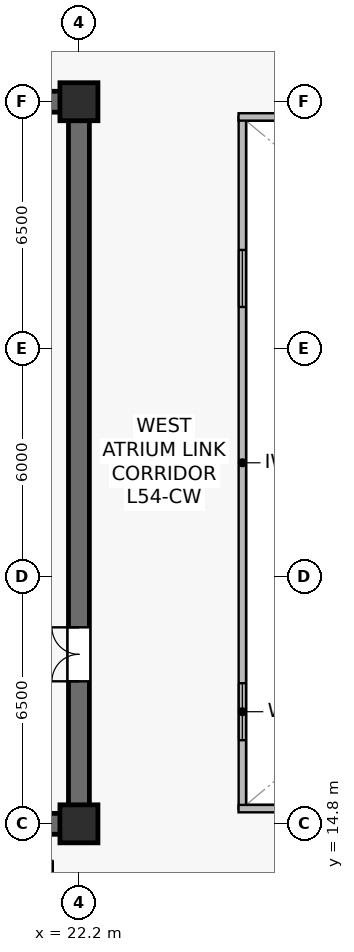
"""IFC4 building model, lengths in metres.
Left out: names, types, materials, properties, quantities, classifications, styles, units other than length and angle.
Written with IfcOpenShell. Run it as: python <this file> out.ifc"""

import sys

from ifc_helpers import new_model, si_unit, direction, frame, frame_2d, origin, origin_2d, place, context, subcontext, project, spatial, rectangle, extrude, source, transform, mapped, element, fill, save


model = new_model("IFC4")
c1 = context("Model", 3, precision=1e-05, world=origin(), true_north=direction((0.0, 1.0)))
c2 = subcontext(c1, "Body", "Model", "MODEL_VIEW")
j1 = project(units=[si_unit("LENGTHUNIT", "METRE"), si_unit("PLANEANGLEUNIT", "RADIAN")], contexts=[c1])
p1 = place(None, origin())
s1 = spatial("IfcSite", under=j1, at=p1, CompositionType="ELEMENT")
p2 = place(p1, origin())
s2 = spatial("IfcBuilding", under=s1, at=p2, CompositionType="ELEMENT")
p3 = place(p2, frame((0.0, 0.0, 226.0)))
s3 = spatial("IfcBuildingStorey", under=s2, at=p3, CompositionType="ELEMENT", Elevation=226.0)
p4 = place(p3, frame((7.125, 14.8, 0.0), z_axis=(0.0, 0.0, 1.0), x_axis=(1.0, 0.0, 0.0)))
e1 = element("IfcWall", 1, at=p4, inside=s3, PredefinedType="SHEAR", context=c2, shape_type="SweptSolid", body=[
    extrude(rectangle(XDim=15.35, YDim=0.55, at=frame_2d((7.675, 0.0))), origin(), (0.0, 0.0, 1.0), 3.8),
])
p5 = place(p3, frame((7.125, 33.8, 0.0), z_axis=(0.0, 0.0, 1.0), x_axis=(1.0, 0.0, 0.0)))
e2 = element("IfcWall", 2, at=p5, inside=s3, PredefinedType="SHEAR", context=c2, shape_type="SweptSolid", body=[
    extrude(rectangle(XDim=15.35, YDim=0.55, at=frame_2d((7.675, 0.0))), origin(), (0.0, 0.0, 1.0), 3.8),
])
p6 = place(p5, frame((5.2, 0.0, 0.0)))
e3 = element("IfcOpeningElement", 3, at=p6, cuts=e2, PredefinedType="OPENING", context=c2, shape_type="SweptSolid", body=[
    extrude(rectangle(XDim=0.95, YDim=2.15, at=frame_2d((0.475, 1.075))), frame((0.0, 0.285, 0.0), z_axis=(0.0, -1.0, 0.0), x_axis=(1.0, 0.0, 0.0)), (0.0, 0.0, 1.0), 0.57),
])
p7 = place(p5, frame((7.715, 0.0, 0.0)))
e4 = element("IfcOpeningElement", 4, at=p7, cuts=e2, PredefinedType="OPENING", context=c2, shape_type="SweptSolid", body=[
    extrude(rectangle(XDim=0.95, YDim=2.15, at=frame_2d((0.475, 1.075))), frame((0.0, 0.285, 0.0), z_axis=(0.0, -1.0, 0.0), x_axis=(1.0, 0.0, 0.0)), (0.0, 0.0, 1.0), 0.57),
])
p8 = place(p5, frame((10.265, 0.0, 0.0)))
e5 = element("IfcOpeningElement", 5, at=p8, cuts=e2, PredefinedType="OPENING", context=c2, shape_type="SweptSolid", body=[
    extrude(rectangle(XDim=0.95, YDim=2.15, at=frame_2d((0.475, 1.075))), frame((0.0, 0.285, 0.0), z_axis=(0.0, -1.0, 0.0), x_axis=(1.0, 0.0, 0.0)), (0.0, 0.0, 1.0), 0.57),
])
p9 = place(p5, frame((12.815, 0.0, 0.0)))
e6 = element("IfcOpeningElement", 6, at=p9, cuts=e2, PredefinedType="OPENING", context=c2, shape_type="SweptSolid", body=[
    extrude(rectangle(XDim=0.95, YDim=2.15, at=frame_2d((0.475, 1.075))), frame((0.0, 0.285, 0.0), z_axis=(0.0, -1.0, 0.0), x_axis=(1.0, 0.0, 0.0)), (0.0, 0.0, 1.0), 0.57),
])
p10 = place(p3, frame((22.2, 15.075, 0.0), z_axis=(0.0, 0.0, 1.0), x_axis=(0.0, 1.0, 0.0)))
e7 = element("IfcWall", 7, at=p10, inside=s3, PredefinedType="SHEAR", context=c2, shape_type="SweptSolid", body=[
    extrude(rectangle(XDim=18.45, YDim=0.55, at=frame_2d((9.225, 0.0))), origin(), (0.0, 0.0, 1.0), 3.8),
])
p11 = place(p10, frame((3.475, 0.0, 0.0)))
e8 = element("IfcOpeningElement", 8, at=p11, cuts=e7, PredefinedType="OPENING", context=c2, shape_type="SweptSolid", body=[
    extrude(rectangle(XDim=1.42, YDim=2.2, at=frame_2d((0.71, 1.1))), frame((0.0, 0.285, 0.0), z_axis=(0.0, -1.0, 0.0), x_axis=(1.0, 0.0, 0.0)), (0.0, 0.0, 1.0), 0.57),
])
m1 = source(origin(), c2, "Body", "SweptSolid", [
    extrude(rectangle(XDim=1.0, YDim=1.0, at=origin_2d()), origin(), (0.0, 0.0, 1.0), 4.1),
])
for number, where, z_axis, x_axis in (
    (9, (22.2, 14.8, 0.0), (0.0, 0.0, 1.0), (1.0, 0.0, 0.0)),
    (10, (22.2, 33.8, 0.0), (0.0, 0.0, 1.0), (1.0, 0.0, 0.0)),
):
    element("IfcColumn", number, at=place(p3, frame(where, z_axis=z_axis, x_axis=x_axis)), inside=s3, PredefinedType="COLUMN", context=c2, shape_type="MappedRepresentation", body=[
        mapped(m1, transform((0.0, 0.0, 0.0), scale=1.0)),
    ])
p12 = place(p3, frame((26.5, 15.2, 0.0), z_axis=(0.0, 0.0, 1.0), x_axis=(0.0, 1.0, 0.0)))
e11 = element("IfcWall", 11, at=p12, inside=s3, PredefinedType="SOLIDWALL", context=c2, shape_type="SweptSolid", body=[
    extrude(rectangle(XDim=18.2, YDim=0.195, at=frame_2d((9.1, 0.0))), origin(), (0.0, 0.0, 1.0), 3.8),
])
p13 = place(p12, frame((1.8, 0.0, 0.9)))
e12 = element("IfcOpeningElement", 12, at=p13, cuts=e11, PredefinedType="OPENING", context=c2, shape_type="SweptSolid", body=[
    extrude(rectangle(XDim=1.5, YDim=1.4, at=frame_2d((0.75, 0.7))), frame((0.0, 0.107, 0.0), z_axis=(0.0, -1.0, 0.0), x_axis=(1.0, 0.0, 0.0)), (0.0, 0.0, 1.0), 0.215),
])
p14 = place(p12, frame((13.2, 0.0, 0.9)))
e13 = element("IfcOpeningElement", 13, at=p14, cuts=e11, PredefinedType="OPENING", context=c2, shape_type="SweptSolid", body=[
    extrude(rectangle(XDim=1.5, YDim=1.4, at=frame_2d((0.75, 0.7))), frame((0.0, 0.107, 0.0), z_axis=(0.0, -1.0, 0.0), x_axis=(1.0, 0.0, 0.0)), (0.0, 0.0, 1.0), 0.215),
])
for number, where, z_axis, x_axis in (
    (14, (26.4, 15.2, 0.0), (0.0, 0.0, 1.0), (1.0, 0.0, 0.0)),
    (15, (26.4, 33.4, 0.0), (0.0, 0.0, 1.0), (1.0, 0.0, 0.0)),
):
    element("IfcWall", number, at=place(p3, frame(where, z_axis=z_axis, x_axis=x_axis)), inside=s3, PredefinedType="SOLIDWALL", context=c2, shape_type="SweptSolid", body=[
        extrude(rectangle(XDim=22.0, YDim=0.195, at=frame_2d((11.0, 0.0))), origin(), (0.0, 0.0, 1.0), 3.8),
    ])
m2 = source(origin(), c2, "Body", "SweptSolid", [
    extrude(rectangle(XDim=1.5, YDim=1.4, at=frame_2d((0.75, 0.7))), frame((0.0, 0.03, 0.0), z_axis=(0.0, -1.0, 0.0), x_axis=(1.0, 0.0, 0.0)), (0.0, 0.0, 1.0), 0.06),
])
p15 = place(p13, origin())
e16 = element("IfcWindow", 16, at=p15, inside=s3, PartitioningType="SINGLE_PANEL", PredefinedType="WINDOW", context=c2, shape_type="MappedRepresentation", body=[
    mapped(m2, transform((0.0, 0.0, 0.0), scale=1.0)),
])
fill(e12, e16)
p16 = place(p14, origin())
e17 = element("IfcWindow", 17, at=p16, inside=s3, PartitioningType="SINGLE_PANEL", PredefinedType="WINDOW", context=c2, shape_type="MappedRepresentation", body=[
    mapped(m2, transform((0.0, 0.0, 0.0), scale=1.0)),
])
fill(e13, e17)
m3 = source(origin(), c2, "Body", "SweptSolid", [
    extrude(rectangle(XDim=1.42, YDim=2.2, at=frame_2d((0.71, 1.1))), frame((0.0, 0.025, 0.0), z_axis=(0.0, -1.0, 0.0), x_axis=(1.0, 0.0, 0.0)), (0.0, 0.0, 1.0), 0.05),
])
p17 = place(p11, origin())
e18 = element("IfcDoor", 18, at=p17, inside=s3, OperationType="DOUBLE_DOOR_SINGLE_SWING", PredefinedType="DOOR", context=c2, shape_type="MappedRepresentation", body=[
    mapped(m3, transform((0.0, 0.0, 0.0), scale=1.0)),
])
fill(e8, e18)
save(model, sys.argv[1])
